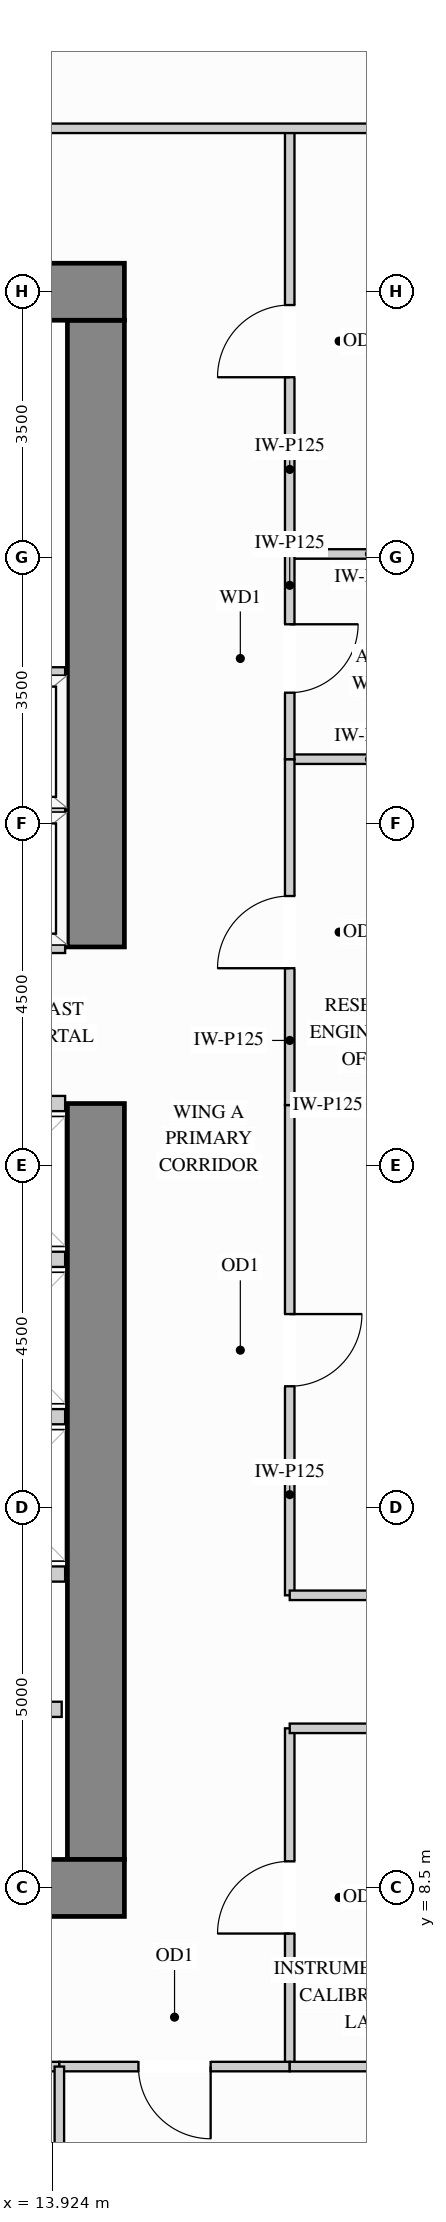
"""IFC4 building model, lengths in metres.
Left out: names, types, materials, properties, quantities, classifications, styles, units other than length and angle.
Written with IfcOpenShell. Run it as: python <this file> out.ifc"""

import sys

from ifc_helpers import new_model, si_unit, direction, frame, frame_2d, origin, place, context, subcontext, project, spatial, rectangle, extrude, source, transform, mapped, element, fill, save


model = new_model("IFC4")
c1 = context("Model", 3, precision=1e-05, world=origin(), true_north=direction((0.0, 1.0)))
c2 = subcontext(c1, "Body", "Model", "MODEL_VIEW")
j1 = project(units=[si_unit("LENGTHUNIT", "METRE"), si_unit("PLANEANGLEUNIT", "RADIAN")], contexts=[c1])
p1 = place(None, origin())
s1 = spatial("IfcSite", under=j1, at=p1, CompositionType="ELEMENT")
p2 = place(p1, origin())
s2 = spatial("IfcBuilding", under=s1, at=p2, CompositionType="ELEMENT")
p3 = place(p2, frame((0.0, 0.0, 120.6)))
s3 = spatial("IfcBuildingStorey", under=s2, at=p3, CompositionType="ELEMENT", Elevation=120.6)
m1 = source(origin(), c2, "Body", "SweptSolid", [
    extrude(rectangle(XDim=9.945, YDim=0.75, at=frame_2d((4.973, 0.0))), origin(), (0.0, 0.0, 1.0), 3.38),
])
p4 = place(p3, frame((14.5, 8.875, 0.0), z_axis=(0.0, 0.0, 1.0), x_axis=(0.0, 1.0, 0.0)))
e1 = element("IfcWall", 1, at=p4, inside=s3, PredefinedType="SHEAR", context=c2, shape_type="MappedRepresentation", body=[
    mapped(m1, transform((0.0, 0.0, 0.0), x_axis=(1.0, 0.0, 0.0), y_axis=(0.0, 1.0, 0.0), z_axis=(0.0, 0.0, 1.0))),
])
m2 = source(origin(), c2, "Body", "SweptSolid", [
    extrude(rectangle(XDim=8.245, YDim=0.75, at=frame_2d((4.123, 0.0))), origin(), (0.0, 0.0, 1.0), 3.38),
])
p5 = place(p3, frame((14.5, 20.88, 0.0), z_axis=(0.0, 0.0, 1.0), x_axis=(0.0, 1.0, 0.0)))
e2 = element("IfcWall", 2, at=p5, inside=s3, PredefinedType="SHEAR", context=c2, shape_type="MappedRepresentation", body=[
    mapped(m2, transform((0.0, 0.0, 0.0), x_axis=(1.0, 0.0, 0.0), y_axis=(0.0, 1.0, 0.0), z_axis=(0.0, 0.0, 1.0))),
])
m3 = source(origin(), c2, "Body", "SweptSolid", [
    extrude(rectangle(XDim=10.75, YDim=0.75, at=frame_2d((5.375, 0.0))), origin(), (0.0, 0.0, 1.0), 3.38),
])
for number, where, z_axis, x_axis in (
    (3, (4.125, 29.5, 0.0), (0.0, 0.0, 1.0), (1.0, 0.0, 0.0)),
    (4, (4.125, 8.5, 0.0), (0.0, 0.0, 1.0), (1.0, 0.0, 0.0)),
):
    element("IfcWall", number, at=place(p3, frame(where, z_axis=z_axis, x_axis=x_axis)), inside=s3, PredefinedType="SHEAR", context=c2, shape_type="MappedRepresentation", body=[
        mapped(m3, transform((0.0, 0.0, 0.0), x_axis=(1.0, 0.0, 0.0), y_axis=(0.0, 1.0, 0.0), z_axis=(0.0, 0.0, 1.0))),
    ])
m4 = source(origin(), c2, "Body", "SweptSolid", [
    extrude(rectangle(XDim=2.1, YDim=0.125, at=frame_2d((1.05, 0.0))), origin(), (0.0, 0.0, 1.0), 3.365),
])
p6 = place(p3, frame((17.05, 18.8, 0.0), z_axis=(0.0, 0.0, 1.0), x_axis=(1.0, 0.0, 0.0)))
e5 = element("IfcWall", 5, at=p6, inside=s3, PredefinedType="PARTITIONING", context=c2, shape_type="MappedRepresentation", body=[
    mapped(m4, transform((0.0, 0.0, 0.0), x_axis=(1.0, 0.0, 0.0), y_axis=(0.0, 1.0, 0.0), z_axis=(0.0, 0.0, 1.0))),
])
m5 = source(origin(), c2, "Body", "SweptSolid", [
    extrude(rectangle(XDim=2.098, YDim=0.125, at=frame_2d((1.049, 0.0))), origin(), (0.0, 0.0, 1.0), 3.365),
])
for number, where, z_axis, x_axis in (
    (6, (17.05, 23.35, 0.0), (0.0, 0.0, 1.0), (1.0, 0.0, 0.0)),
    (7, (17.05, 26.05, 0.0), (0.0, 0.0, 1.0), (1.0, 0.0, 0.0)),
):
    element("IfcWall", number, at=place(p3, frame(where, z_axis=z_axis, x_axis=x_axis)), inside=s3, PredefinedType="PARTITIONING", context=c2, shape_type="MappedRepresentation", body=[
        mapped(m5, transform((0.0, 0.0, 0.0), x_axis=(1.0, 0.0, 0.0), y_axis=(0.0, 1.0, 0.0), z_axis=(0.0, 0.0, 1.0))),
    ])
p7 = place(p3, frame((17.05, 12.35, 0.0), z_axis=(0.0, 0.0, 1.0), x_axis=(0.0, 1.0, 0.0)))
e8 = element("IfcWall", 8, at=p7, inside=s3, PredefinedType="PARTITIONING", context=c2, shape_type="SweptSolid", body=[
    extrude(rectangle(XDim=6.45, YDim=0.125, at=frame_2d((3.225, 0.0))), origin(), (0.0, 0.0, 1.0), 3.365),
])
p8 = place(p7, frame((2.75, 0.0, 0.0)))
e9 = element("IfcOpeningElement", 9, at=p8, cuts=e8, PredefinedType="OPENING", context=c2, shape_type="SweptSolid", body=[
    extrude(rectangle(XDim=0.95, YDim=2.15, at=frame_2d((0.475, 1.075))), frame((0.0, 0.073, 0.0), z_axis=(0.0, -1.0, 0.0), x_axis=(1.0, 0.0, 0.0)), (0.0, 0.0, 1.0), 0.145),
])
p9 = place(p3, frame((17.05, 18.8, 0.0), z_axis=(0.0, 0.0, 1.0), x_axis=(0.0, 1.0, 0.0)))
e10 = element("IfcWall", 10, at=p9, inside=s3, PredefinedType="PARTITIONING", context=c2, shape_type="SweptSolid", body=[
    extrude(rectangle(XDim=4.55, YDim=0.125, at=frame_2d((2.275, 0.0))), origin(), (0.0, 0.0, 1.0), 3.365),
])
p10 = place(p9, frame((1.8, 0.0, 0.0)))
e11 = element("IfcOpeningElement", 11, at=p10, cuts=e10, PredefinedType="OPENING", context=c2, shape_type="SweptSolid", body=[
    extrude(rectangle(XDim=0.95, YDim=2.15, at=frame_2d((0.475, 1.075))), frame((0.0, 0.073, 0.0), z_axis=(0.0, -1.0, 0.0), x_axis=(1.0, 0.0, 0.0)), (0.0, 0.0, 1.0), 0.145),
])
p11 = place(p3, frame((17.05, 26.05, 0.0), z_axis=(0.0, 0.0, 1.0), x_axis=(0.0, 1.0, 0.0)))
e12 = element("IfcWall", 12, at=p11, inside=s3, PredefinedType="PARTITIONING", context=c2, shape_type="SweptSolid", body=[
    extrude(rectangle(XDim=5.6, YDim=0.125, at=frame_2d((2.8, 0.0))), origin(), (0.0, 0.0, 1.0), 3.365),
])
p12 = place(p11, frame((2.325, 0.0, 0.0)))
e13 = element("IfcOpeningElement", 13, at=p12, cuts=e12, PredefinedType="OPENING", context=c2, shape_type="SweptSolid", body=[
    extrude(rectangle(XDim=0.95, YDim=2.15, at=frame_2d((0.475, 1.075))), frame((0.0, 0.073, 0.0), z_axis=(0.0, -1.0, 0.0), x_axis=(1.0, 0.0, 0.0)), (0.0, 0.0, 1.0), 0.145),
])
p13 = place(p3, frame((17.05, 6.15, 0.0), z_axis=(0.0, 0.0, 1.0), x_axis=(0.0, 1.0, 0.0)))
e14 = element("IfcWall", 14, at=p13, inside=s3, PredefinedType="PARTITIONING", context=c2, shape_type="SweptSolid", body=[
    extrude(rectangle(XDim=4.45, YDim=0.125, at=frame_2d((2.225, 0.0))), origin(), (0.0, 0.0, 1.0), 3.365),
])
p14 = place(p13, frame((1.75, 0.0, 0.0)))
e15 = element("IfcOpeningElement", 15, at=p14, cuts=e14, PredefinedType="OPENING", context=c2, shape_type="SweptSolid", body=[
    extrude(rectangle(XDim=0.95, YDim=2.15, at=frame_2d((0.475, 1.075))), frame((0.0, 0.073, 0.0), z_axis=(0.0, -1.0, 0.0), x_axis=(1.0, 0.0, 0.0)), (0.0, 0.0, 1.0), 0.145),
])
p15 = place(p3, frame((17.05, 23.35, 0.0), z_axis=(0.0, 0.0, 1.0), x_axis=(0.0, 1.0, 0.0)))
e16 = element("IfcWall", 16, at=p15, inside=s3, PredefinedType="PARTITIONING", context=c2, shape_type="SweptSolid", body=[
    extrude(rectangle(XDim=2.7, YDim=0.125, at=frame_2d((1.35, 0.0))), origin(), (0.0, 0.0, 1.0), 3.365),
])
p16 = place(p15, frame((0.875, 0.0, 0.0)))
e17 = element("IfcOpeningElement", 17, at=p16, cuts=e16, PredefinedType="OPENING", context=c2, shape_type="SweptSolid", body=[
    extrude(rectangle(XDim=0.9, YDim=2.15, at=frame_2d((0.45, 1.075))), frame((0.0, 0.073, 0.0), z_axis=(0.0, -1.0, 0.0), x_axis=(1.0, 0.0, 0.0)), (0.0, 0.0, 1.0), 0.145),
])
m6 = source(origin(), c2, "Body", "SweptSolid", [
    extrude(rectangle(XDim=12.598, YDim=0.125, at=frame_2d((6.299, 0.0))), origin(), (0.0, 0.0, 1.0), 2.828),
])
p17 = place(p3, frame((6.55, 31.65, 0.0), z_axis=(0.0, 0.0, 1.0), x_axis=(1.0, 0.0, 0.0)))
e18 = element("IfcWall", 18, at=p17, inside=s3, PredefinedType="PARTITIONING", context=c2, shape_type="MappedRepresentation", body=[
    mapped(m6, transform((0.0, 0.0, 0.0), x_axis=(1.0, 0.0, 0.0), y_axis=(0.0, 1.0, 0.0), z_axis=(0.0, 0.0, 1.0))),
])
m7 = source(origin(), c2, "Body", "SweptSolid", [
    extrude(rectangle(XDim=2.45, YDim=0.125, at=frame_2d((1.225, 0.0))), origin(), (0.0, 0.0, 1.0), 3.365),
])
for number, where, z_axis, x_axis in (
    (19, (17.05, 12.35, 0.0), (0.0, 0.0, 1.0), (1.0, 0.0, 0.0)),
    (20, (17.05, 10.6, 0.0), (0.0, 0.0, 1.0), (1.0, 0.0, 0.0)),
):
    element("IfcWall", number, at=place(p3, frame(where, z_axis=z_axis, x_axis=x_axis)), inside=s3, PredefinedType="PARTITIONING", context=c2, shape_type="MappedRepresentation", body=[
        mapped(m7, transform((0.0, 0.0, 0.0), x_axis=(1.0, 0.0, 0.0), y_axis=(0.0, 1.0, 0.0), z_axis=(0.0, 0.0, 1.0))),
    ])
p18 = place(p3, frame((8.392, 6.15, 0.0), z_axis=(0.0, 0.0, 1.0), x_axis=(1.0, 0.0, 0.0)))
e21 = element("IfcWall", 21, at=p18, inside=s3, PredefinedType="PARTITIONING", context=c2, shape_type="SweptSolid", body=[
    extrude(rectangle(XDim=5.627, YDim=0.125, at=frame_2d((2.813, 0.0))), origin(), (0.0, 0.0, 1.0), 3.365),
])
p19 = place(p18, frame((2.338, 0.0, 0.0)))
e22 = element("IfcOpeningElement", 22, at=p19, cuts=e21, PredefinedType="OPENING", context=c2, shape_type="SweptSolid", body=[
    extrude(rectangle(XDim=0.95, YDim=2.15, at=frame_2d((0.475, 1.075))), frame((0.0, 0.073, 0.0), z_axis=(0.0, -1.0, 0.0), x_axis=(1.0, 0.0, 0.0)), (0.0, 0.0, 1.0), 0.145),
])
p20 = place(p3, frame((14.019, 6.15, 0.0), z_axis=(0.0, 0.0, 1.0), x_axis=(1.0, 0.0, 0.0)))
e23 = element("IfcWall", 23, at=p20, inside=s3, PredefinedType="PARTITIONING", context=c2, shape_type="SweptSolid", body=[
    extrude(rectangle(XDim=3.031, YDim=0.125, at=frame_2d((1.516, 0.0))), origin(), (0.0, 0.0, 1.0), 3.365),
])
p21 = place(p20, frame((1.041, 0.0, 0.0)))
e24 = element("IfcOpeningElement", 24, at=p21, cuts=e23, PredefinedType="OPENING", context=c2, shape_type="SweptSolid", body=[
    extrude(rectangle(XDim=0.95, YDim=2.15, at=frame_2d((0.475, 1.075))), frame((0.0, 0.073, 0.0), z_axis=(0.0, -1.0, 0.0), x_axis=(1.0, 0.0, 0.0)), (0.0, 0.0, 1.0), 0.145),
])
p22 = place(p3, frame((17.05, 6.15, 0.0), z_axis=(0.0, 0.0, 1.0), x_axis=(1.0, 0.0, 0.0)))
e25 = element("IfcWall", 25, at=p22, inside=s3, PredefinedType="PARTITIONING", context=c2, shape_type="MappedRepresentation", body=[
    mapped(m5, transform((0.0, 0.0, 0.0), x_axis=(1.0, 0.0, 0.0), y_axis=(0.0, 1.0, 0.0), z_axis=(0.0, 0.0, 1.0))),
])
m8 = source(origin(), c2, "Body", "SweptSolid", [
    extrude(rectangle(XDim=4.96, YDim=0.125, at=frame_2d((2.48, 0.0))), origin(), (0.0, 0.0, 1.0), 3.365),
])
p23 = place(p3, frame((14.019, 1.19, 0.0), z_axis=(0.0, 0.0, 1.0), x_axis=(0.0, 1.0, 0.0)))
e26 = element("IfcWall", 26, at=p23, inside=s3, PredefinedType="PARTITIONING", context=c2, shape_type="MappedRepresentation", body=[
    mapped(m8, transform((0.0, 0.0, 0.0), x_axis=(1.0, 0.0, 0.0), y_axis=(0.0, 1.0, 0.0), z_axis=(0.0, 0.0, 1.0))),
])
m9 = source(origin(), c2, "Body", "SweptSolid", [
    extrude(rectangle(XDim=1.63, YDim=0.2, at=frame_2d((0.815, 0.0))), origin(), (0.0, 0.0, 1.0), 3.365),
])
p24 = place(p3, frame((12.42, 10.85, 0.0), z_axis=(0.0, 0.0, 1.0), x_axis=(1.0, 0.0, 0.0)))
e27 = element("IfcWall", 27, at=p24, inside=s3, PredefinedType="PARTITIONING", context=c2, shape_type="MappedRepresentation", body=[
    mapped(m9, transform((0.0, 0.0, 0.0), x_axis=(1.0, 0.0, 0.0), y_axis=(0.0, 1.0, 0.0), z_axis=(0.0, 0.0, 1.0))),
])
m10 = source(origin(), c2, "Body", "SweptSolid", [
    extrude(rectangle(XDim=2.265, YDim=0.2, at=frame_2d((1.132, 0.0))), origin(), (0.0, 0.0, 1.0), 3.365),
])
for number, where, z_axis, x_axis in (
    (28, (11.83, 22.66, 0.0), (0.0, 0.0, 1.0), (1.0, 0.0, 0.0)),
    (29, (11.83, 20.9, 0.0), (0.0, 0.0, 1.0), (1.0, 0.0, 0.0)),
    (30, (11.83, 24.46, 0.0), (0.0, 0.0, 1.0), (1.0, 0.0, 0.0)),
):
    element("IfcWall", number, at=place(p3, frame(where, z_axis=z_axis, x_axis=x_axis)), inside=s3, PredefinedType="PARTITIONING", context=c2, shape_type="MappedRepresentation", body=[
        mapped(m10, transform((0.0, 0.0, 0.0), x_axis=(1.0, 0.0, 0.0), y_axis=(0.0, 1.0, 0.0), z_axis=(0.0, 0.0, 1.0))),
    ])
m11 = source(origin(), c2, "Body", "SweptSolid", [
    extrude(rectangle(XDim=1.865, YDim=0.2, at=frame_2d((0.933, 0.0))), origin(), (0.0, 0.0, 1.0), 3.365),
])
for number, where, z_axis, x_axis in (
    (31, (12.23, 14.7, 0.0), (0.0, 0.0, 1.0), (1.0, 0.0, 0.0)),
    (32, (12.23, 12.63, 0.0), (0.0, 0.0, 1.0), (1.0, 0.0, 0.0)),
    (33, (12.23, 16.77, 0.0), (0.0, 0.0, 1.0), (1.0, 0.0, 0.0)),
    (34, (12.23, 18.82, 0.0), (0.0, 0.0, 1.0), (1.0, 0.0, 0.0)),
):
    element("IfcWall", number, at=place(p3, frame(where, z_axis=z_axis, x_axis=x_axis)), inside=s3, PredefinedType="PARTITIONING", context=c2, shape_type="MappedRepresentation", body=[
        mapped(m11, transform((0.0, 0.0, 0.0), x_axis=(1.0, 0.0, 0.0), y_axis=(0.0, 1.0, 0.0), z_axis=(0.0, 0.0, 1.0))),
    ])
m12 = source(origin(), c2, "Body", "SweptSolid", [
    extrude(rectangle(XDim=0.95, YDim=2.15, at=frame_2d((0.475, 1.075))), frame((0.0, 0.025, 0.0), z_axis=(0.0, -1.0, 0.0), x_axis=(1.0, 0.0, 0.0)), (0.0, 0.0, 1.0), 0.05),
])
p25 = place(p14, origin())
e35 = element("IfcDoor", 35, at=p25, inside=s3, OperationType="SINGLE_SWING_LEFT", PredefinedType="DOOR", context=c2, shape_type="MappedRepresentation", body=[
    mapped(m12, transform((0.0, 0.0, 0.0), x_axis=(1.0, 0.0, 0.0), y_axis=(0.0, 1.0, 0.0), z_axis=(0.0, 0.0, 1.0))),
])
fill(e15, e35)
p26 = place(p8, origin())
e36 = element("IfcDoor", 36, at=p26, inside=s3, OperationType="SINGLE_SWING_RIGHT", PredefinedType="DOOR", context=c2, shape_type="MappedRepresentation", body=[
    mapped(m12, transform((0.0, 0.0, 0.0), x_axis=(1.0, 0.0, 0.0), y_axis=(0.0, 1.0, 0.0), z_axis=(0.0, 0.0, 1.0))),
])
fill(e9, e36)
p27 = place(p10, origin())
e37 = element("IfcDoor", 37, at=p27, inside=s3, OperationType="SINGLE_SWING_LEFT", PredefinedType="DOOR", context=c2, shape_type="MappedRepresentation", body=[
    mapped(m12, transform((0.0, 0.0, 0.0), x_axis=(1.0, 0.0, 0.0), y_axis=(0.0, 1.0, 0.0), z_axis=(0.0, 0.0, 1.0))),
])
fill(e11, e37)
p28 = place(p12, origin())
e38 = element("IfcDoor", 38, at=p28, inside=s3, OperationType="SINGLE_SWING_LEFT", PredefinedType="DOOR", context=c2, shape_type="MappedRepresentation", body=[
    mapped(m12, transform((0.0, 0.0, 0.0), x_axis=(1.0, 0.0, 0.0), y_axis=(0.0, 1.0, 0.0), z_axis=(0.0, 0.0, 1.0))),
])
fill(e13, e38)
p29 = place(p21, origin())
e39 = element("IfcDoor", 39, at=p29, inside=s3, OperationType="SINGLE_SWING_RIGHT", PredefinedType="DOOR", context=c2, shape_type="MappedRepresentation", body=[
    mapped(m12, transform((0.0, 0.0, 0.0), x_axis=(1.0, 0.0, 0.0), y_axis=(0.0, 1.0, 0.0), z_axis=(0.0, 0.0, 1.0))),
])
fill(e24, e39)
m13 = source(origin(), c2, "Body", "SweptSolid", [
    extrude(rectangle(XDim=0.9, YDim=2.15, at=frame_2d((0.45, 1.075))), frame((0.0, 0.025, 0.0), z_axis=(0.0, -1.0, 0.0), x_axis=(1.0, 0.0, 0.0)), (0.0, 0.0, 1.0), 0.05),
])
p30 = place(p16, origin())
e40 = element("IfcDoor", 40, at=p30, inside=s3, OperationType="SINGLE_SWING_RIGHT", PredefinedType="DOOR", context=c2, shape_type="MappedRepresentation", body=[
    mapped(m13, transform((0.0, 0.0, 0.0), x_axis=(1.0, 0.0, 0.0), y_axis=(0.0, 1.0, 0.0), z_axis=(0.0, 0.0, 1.0))),
])
fill(e17, e40)
save(model, sys.argv[1])
